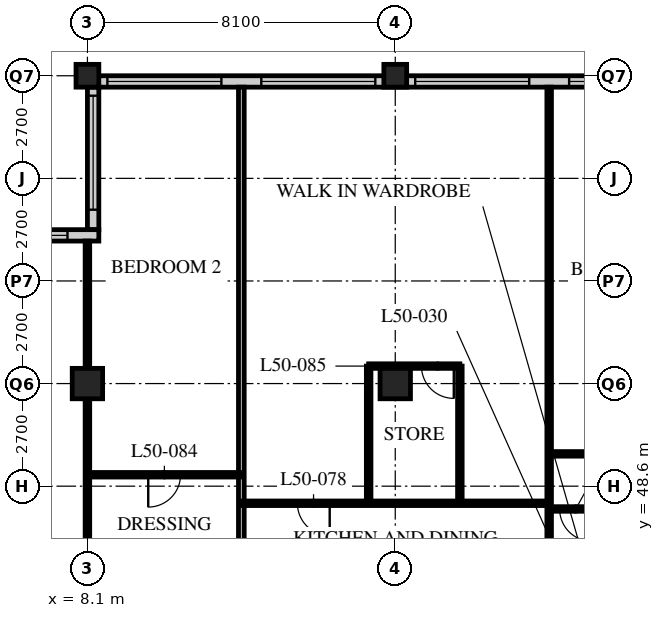
"""IFC4 building model, lengths in metres.
Left out: names, types, materials, properties, quantities, classifications, styles, units other than length and angle.
Written with IfcOpenShell. Run it as: python <this file> out.ifc"""

import sys

from ifc_helpers import new_model, si_unit, direction, frame, frame_2d, origin, origin_2d, place, context, subcontext, project, spatial, rectangle, hollow_rectangle, extrude, element, fill, save


model = new_model("IFC4")
c1 = context("Model", 3, precision=1e-05, world=origin(), true_north=direction((0.0, 1.0)))
c2 = subcontext(c1, "Body", "Model", "MODEL_VIEW")
j1 = project(units=[si_unit("LENGTHUNIT", "METRE"), si_unit("PLANEANGLEUNIT", "RADIAN")], contexts=[c1])
p1 = place(None, origin())
s1 = spatial("IfcSite", under=j1, at=p1, CompositionType="ELEMENT")
p2 = place(p1, origin())
s2 = spatial("IfcBuilding", under=s1, at=p2, CompositionType="ELEMENT")
p3 = place(p2, frame((0.0, 0.0, 195.6)))
s3 = spatial("IfcBuildingStorey", under=s2, at=p3, CompositionType="ELEMENT", Elevation=195.6)
p4 = place(p3, frame((8.1, 51.3, 0.0), z_axis=(0.0, 0.0, 1.0), x_axis=(1.0, 0.0, 0.0)))
e1 = element("IfcColumn", 1, at=p4, inside=s3, PredefinedType="COLUMN", context=c2, shape_type="SweptSolid", body=[
    extrude(hollow_rectangle(XDim=0.8, YDim=0.8, WallThickness=0.08, at=origin_2d()), origin(), (0.0, 0.0, 1.0), 3.6),
])
p5 = place(p3, frame((8.1, 59.4, 0.0), z_axis=(0.0, 0.0, 1.0), x_axis=(1.0, 0.0, 0.0)))
e2 = element("IfcColumn", 2, at=p5, inside=s3, PredefinedType="COLUMN", context=c2, shape_type="SweptSolid", body=[
    extrude(hollow_rectangle(XDim=0.6, YDim=0.6, WallThickness=0.05, at=origin_2d()), origin(), (0.0, 0.0, 1.0), 3.6),
])
p6 = place(p3, frame((16.2, 51.3, 0.0), z_axis=(0.0, 0.0, 1.0), x_axis=(1.0, 0.0, 0.0)))
e3 = element("IfcColumn", 3, at=p6, inside=s3, PredefinedType="COLUMN", context=c2, shape_type="SweptSolid", body=[
    extrude(hollow_rectangle(XDim=0.8, YDim=0.8, WallThickness=0.08, at=origin_2d()), origin(), (0.0, 0.0, 1.0), 3.6),
])
p7 = place(p3, frame((16.2, 59.4, 0.0), z_axis=(0.0, 0.0, 1.0), x_axis=(1.0, 0.0, 0.0)))
e4 = element("IfcColumn", 4, at=p7, inside=s3, PredefinedType="COLUMN", context=c2, shape_type="SweptSolid", body=[
    extrude(hollow_rectangle(XDim=0.6, YDim=0.6, WallThickness=0.05, at=origin_2d()), origin(), (0.0, 0.0, 1.0), 3.6),
])
p8 = place(p3, frame((48.3, 59.25, 0.0), z_axis=(0.0, 0.0, 1.0), x_axis=(-1.0, 0.0, 0.0)))
e5 = element("IfcWall", 5, at=p8, inside=s3, PredefinedType="SOLIDWALL", context=c2, shape_type="SweptSolid", body=[
    extrude(rectangle(XDim=40.2, YDim=0.3, at=frame_2d((20.1, 0.0))), origin(), (0.0, 0.0, 1.0), 3.39),
])
p9 = place(p8, frame((0.225, 0.0, 0.6)))
e6 = element("IfcOpeningElement", 6, at=p9, cuts=e5, PredefinedType="OPENING", context=c2, shape_type="SweptSolid", body=[
    extrude(rectangle(XDim=3.0, YDim=2.4, at=frame_2d((1.5, 1.2))), frame((0.0, 0.16, 0.0), z_axis=(0.0, -1.0, 0.0), x_axis=(1.0, 0.0, 0.0)), (0.0, 0.0, 1.0), 0.32),
])
p10 = place(p8, frame((4.275, 0.0, 0.6)))
e7 = element("IfcOpeningElement", 7, at=p10, cuts=e5, PredefinedType="OPENING", context=c2, shape_type="SweptSolid", body=[
    extrude(rectangle(XDim=3.0, YDim=2.4, at=frame_2d((1.5, 1.2))), frame((0.0, 0.16, 0.0), z_axis=(0.0, -1.0, 0.0), x_axis=(1.0, 0.0, 0.0)), (0.0, 0.0, 1.0), 0.32),
])
p11 = place(p8, frame((8.325, 0.0, 0.6)))
e8 = element("IfcOpeningElement", 8, at=p11, cuts=e5, PredefinedType="OPENING", context=c2, shape_type="SweptSolid", body=[
    extrude(rectangle(XDim=3.0, YDim=2.4, at=frame_2d((1.5, 1.2))), frame((0.0, 0.16, 0.0), z_axis=(0.0, -1.0, 0.0), x_axis=(1.0, 0.0, 0.0)), (0.0, 0.0, 1.0), 0.32),
])
p12 = place(p8, frame((12.375, 0.0, 0.6)))
e9 = element("IfcOpeningElement", 9, at=p12, cuts=e5, PredefinedType="OPENING", context=c2, shape_type="SweptSolid", body=[
    extrude(rectangle(XDim=3.0, YDim=2.4, at=frame_2d((1.5, 1.2))), frame((0.0, 0.16, 0.0), z_axis=(0.0, -1.0, 0.0), x_axis=(1.0, 0.0, 0.0)), (0.0, 0.0, 1.0), 0.32),
])
p13 = place(p8, frame((16.425, 0.0, 0.6)))
e10 = element("IfcOpeningElement", 10, at=p13, cuts=e5, PredefinedType="OPENING", context=c2, shape_type="SweptSolid", body=[
    extrude(rectangle(XDim=3.0, YDim=2.4, at=frame_2d((1.5, 1.2))), frame((0.0, 0.16, 0.0), z_axis=(0.0, -1.0, 0.0), x_axis=(1.0, 0.0, 0.0)), (0.0, 0.0, 1.0), 0.32),
])
p14 = place(p8, frame((20.475, 0.0, 0.6)))
e11 = element("IfcOpeningElement", 11, at=p14, cuts=e5, PredefinedType="OPENING", context=c2, shape_type="SweptSolid", body=[
    extrude(rectangle(XDim=3.0, YDim=2.4, at=frame_2d((1.5, 1.2))), frame((0.0, 0.16, 0.0), z_axis=(0.0, -1.0, 0.0), x_axis=(1.0, 0.0, 0.0)), (0.0, 0.0, 1.0), 0.32),
])
p15 = place(p8, frame((24.525, 0.0, 0.6)))
e12 = element("IfcOpeningElement", 12, at=p15, cuts=e5, PredefinedType="OPENING", context=c2, shape_type="SweptSolid", body=[
    extrude(rectangle(XDim=3.0, YDim=2.4, at=frame_2d((1.5, 1.2))), frame((0.0, 0.16, 0.0), z_axis=(0.0, -1.0, 0.0), x_axis=(1.0, 0.0, 0.0)), (0.0, 0.0, 1.0), 0.32),
])
p16 = place(p8, frame((28.575, 0.0, 0.6)))
e13 = element("IfcOpeningElement", 13, at=p16, cuts=e5, PredefinedType="OPENING", context=c2, shape_type="SweptSolid", body=[
    extrude(rectangle(XDim=3.0, YDim=2.4, at=frame_2d((1.5, 1.2))), frame((0.0, 0.16, 0.0), z_axis=(0.0, -1.0, 0.0), x_axis=(1.0, 0.0, 0.0)), (0.0, 0.0, 1.0), 0.32),
])
p17 = place(p8, frame((32.625, 0.0, 0.6)))
e14 = element("IfcOpeningElement", 14, at=p17, cuts=e5, PredefinedType="OPENING", context=c2, shape_type="SweptSolid", body=[
    extrude(rectangle(XDim=3.0, YDim=2.4, at=frame_2d((1.5, 1.2))), frame((0.0, 0.16, 0.0), z_axis=(0.0, -1.0, 0.0), x_axis=(1.0, 0.0, 0.0)), (0.0, 0.0, 1.0), 0.32),
])
p18 = place(p8, frame((36.675, 0.0, 0.6)))
e15 = element("IfcOpeningElement", 15, at=p18, cuts=e5, PredefinedType="OPENING", context=c2, shape_type="SweptSolid", body=[
    extrude(rectangle(XDim=3.0, YDim=2.4, at=frame_2d((1.5, 1.2))), frame((0.0, 0.16, 0.0), z_axis=(0.0, -1.0, 0.0), x_axis=(1.0, 0.0, 0.0)), (0.0, 0.0, 1.0), 0.32),
])
p19 = place(p3, frame((8.25, 59.1, 0.0), z_axis=(0.0, 0.0, 1.0), x_axis=(0.0, -1.0, 0.0)))
e16 = element("IfcWall", 16, at=p19, inside=s3, PredefinedType="SOLIDWALL", context=c2, shape_type="SweptSolid", body=[
    extrude(rectangle(XDim=3.75, YDim=0.3, at=frame_2d((1.875, 0.0))), origin(), (0.0, 0.0, 1.0), 3.39),
])
p20 = place(p19, frame((0.225, 0.0, 0.6)))
e17 = element("IfcOpeningElement", 17, at=p20, cuts=e16, PredefinedType="OPENING", context=c2, shape_type="SweptSolid", body=[
    extrude(rectangle(XDim=3.0, YDim=2.0, at=frame_2d((1.5, 1.0))), frame((0.0, 0.16, 0.0), z_axis=(0.0, -1.0, 0.0), x_axis=(1.0, 0.0, 0.0)), (0.0, 0.0, 1.0), 0.32),
])
p21 = place(p3, frame((8.4, 55.2, 0.0), z_axis=(0.0, 0.0, 1.0), x_axis=(-1.0, 0.0, 0.0)))
e18 = element("IfcWall", 18, at=p21, inside=s3, PredefinedType="SOLIDWALL", context=c2, shape_type="SweptSolid", body=[
    extrude(rectangle(XDim=4.35, YDim=0.3, at=frame_2d((2.175, 0.0))), origin(), (0.0, 0.0, 1.0), 3.39),
])
p22 = place(p21, frame((0.825, 0.0, 0.6)))
e19 = element("IfcOpeningElement", 19, at=p22, cuts=e18, PredefinedType="OPENING", context=c2, shape_type="SweptSolid", body=[
    extrude(rectangle(XDim=3.0, YDim=2.0, at=frame_2d((1.5, 1.0))), frame((0.0, 0.16, 0.0), z_axis=(0.0, -1.0, 0.0), x_axis=(1.0, 0.0, 0.0)), (0.0, 0.0, 1.0), 0.32),
])
p23 = place(p3, frame((20.25, 45.6, 0.0), z_axis=(0.0, 0.0, 1.0), x_axis=(0.0, 1.0, 0.0)))
e20 = element("IfcWall", 20, at=p23, inside=s3, PredefinedType="PARTITIONING", context=c2, shape_type="SweptSolid", body=[
    extrude(rectangle(XDim=13.5, YDim=0.12, at=frame_2d((6.75, 0.0))), origin(), (0.0, 0.0, 1.0), 3.39),
])
p24 = place(p3, frame((8.1, 45.6, 0.0), z_axis=(0.0, 0.0, 1.0), x_axis=(0.0, 1.0, 0.0)))
e21 = element("IfcWall", 21, at=p24, inside=s3, PredefinedType="PARTITIONING", context=c2, shape_type="SweptSolid", body=[
    extrude(rectangle(XDim=9.45, YDim=0.12, at=frame_2d((4.725, 0.0))), origin(), (0.0, 0.0, 1.0), 2.778),
])
p25 = place(p3, frame((12.15, 43.2, 0.0), z_axis=(0.0, 0.0, 1.0), x_axis=(0.0, 1.0, 0.0)))
e22 = element("IfcWall", 22, at=p25, inside=s3, PredefinedType="PARTITIONING", context=c2, shape_type="SweptSolid", body=[
    extrude(rectangle(XDim=15.9, YDim=0.15, at=frame_2d((7.95, 0.0))), origin(), (0.0, 0.0, 1.0), 3.39),
])
p26 = place(p3, frame((20.25, 48.0, 0.0), z_axis=(0.0, 0.0, 1.0), x_axis=(1.0, 0.0, 0.0)))
e23 = element("IfcWall", 23, at=p26, inside=s3, PredefinedType="PARTITIONING", context=c2, shape_type="SweptSolid", body=[
    extrude(rectangle(XDim=1.76, YDim=0.12, at=frame_2d((0.88, 0.0))), origin(), (0.0, 0.0, 1.0), 3.39),
])
p27 = place(p26, frame((0.275, 0.0, 0.0)))
e24 = element("IfcOpeningElement", 24, at=p27, cuts=e23, PredefinedType="OPENING", context=c2, shape_type="SweptSolid", body=[
    extrude(rectangle(XDim=0.85, YDim=2.1, at=frame_2d((0.425, 1.05))), frame((0.0, 0.07, 0.0), z_axis=(0.0, -1.0, 0.0), x_axis=(1.0, 0.0, 0.0)), (0.0, 0.0, 1.0), 0.14),
])
p28 = place(p3, frame((12.15, 48.15, 0.0), z_axis=(0.0, 0.0, 1.0), x_axis=(1.0, 0.0, 0.0)))
e25 = element("IfcWall", 25, at=p28, inside=s3, PredefinedType="PARTITIONING", context=c2, shape_type="SweptSolid", body=[
    extrude(rectangle(XDim=8.1, YDim=0.12, at=frame_2d((4.05, 0.0))), origin(), (0.0, 0.0, 1.0), 3.39),
])
p29 = place(p28, frame((1.475, 0.0, 0.0)))
e26 = element("IfcOpeningElement", 26, at=p29, cuts=e25, PredefinedType="OPENING", context=c2, shape_type="SweptSolid", body=[
    extrude(rectangle(XDim=0.85, YDim=2.1, at=frame_2d((0.425, 1.05))), frame((0.0, 0.07, 0.0), z_axis=(0.0, -1.0, 0.0), x_axis=(1.0, 0.0, 0.0)), (0.0, 0.0, 1.0), 0.14),
])
p30 = place(p3, frame((20.25, 49.45, 0.0), z_axis=(0.0, 0.0, 1.0), x_axis=(1.0, 0.0, 0.0)))
e27 = element("IfcWall", 27, at=p30, inside=s3, PredefinedType="PARTITIONING", context=c2, shape_type="SweptSolid", body=[
    extrude(rectangle(XDim=4.05, YDim=0.12, at=frame_2d((2.025, 0.0))), origin(), (0.0, 0.0, 1.0), 3.39),
])
p31 = place(p30, frame((1.6, 0.0, 0.0)))
e28 = element("IfcOpeningElement", 28, at=p31, cuts=e27, PredefinedType="OPENING", context=c2, shape_type="SweptSolid", body=[
    extrude(rectangle(XDim=0.85, YDim=2.1, at=frame_2d((0.425, 1.05))), frame((0.0, 0.07, 0.0), z_axis=(0.0, -1.0, 0.0), x_axis=(1.0, 0.0, 0.0)), (0.0, 0.0, 1.0), 0.14),
])
p32 = place(p3, frame((8.1, 48.9, 0.0), z_axis=(0.0, 0.0, 1.0), x_axis=(1.0, 0.0, 0.0)))
e29 = element("IfcWall", 29, at=p32, inside=s3, PredefinedType="PARTITIONING", context=c2, shape_type="SweptSolid", body=[
    extrude(rectangle(XDim=4.05, YDim=0.12, at=frame_2d((2.025, 0.0))), origin(), (0.0, 0.0, 1.0), 3.39),
])
p33 = place(p32, frame((1.6, 0.0, 0.0)))
e30 = element("IfcOpeningElement", 30, at=p33, cuts=e29, PredefinedType="OPENING", context=c2, shape_type="SweptSolid", body=[
    extrude(rectangle(XDim=0.85, YDim=2.1, at=frame_2d((0.425, 1.05))), frame((0.0, 0.07, 0.0), z_axis=(0.0, -1.0, 0.0), x_axis=(1.0, 0.0, 0.0)), (0.0, 0.0, 1.0), 0.14),
])
for number, where, z_axis, x_axis in (
    (31, (15.5, 48.15, 0.0), (0.0, 0.0, 1.0), (0.0, 1.0, 0.0)),
    (32, (17.9, 48.15, 0.0), (0.0, 0.0, 1.0), (0.0, 1.0, 0.0)),
):
    element("IfcWall", number, at=place(p3, frame(where, z_axis=z_axis, x_axis=x_axis)), inside=s3, PredefinedType="PARTITIONING", context=c2, shape_type="SweptSolid", body=[
        extrude(rectangle(XDim=3.61, YDim=0.12, at=frame_2d((1.805, 0.0))), origin(), (0.0, 0.0, 1.0), 3.39),
    ])
p34 = place(p3, frame((15.5, 51.76, 0.0), z_axis=(0.0, 0.0, 1.0), x_axis=(1.0, 0.0, 0.0)))
e33 = element("IfcWall", 33, at=p34, inside=s3, PredefinedType="PARTITIONING", context=c2, shape_type="SweptSolid", body=[
    extrude(rectangle(XDim=2.4, YDim=0.12, at=frame_2d((1.2, 0.0))), origin(), (0.0, 0.0, 1.0), 3.39),
])
p35 = place(p34, frame((1.39, 0.0, 0.0)))
e34 = element("IfcOpeningElement", 34, at=p35, cuts=e33, PredefinedType="OPENING", context=c2, shape_type="SweptSolid", body=[
    extrude(rectangle(XDim=0.85, YDim=2.1, at=frame_2d((0.425, 1.05))), frame((0.0, 0.07, 0.0), z_axis=(0.0, -1.0, 0.0), x_axis=(1.0, 0.0, 0.0)), (0.0, 0.0, 1.0), 0.14),
])
p36 = place(p15, origin())
e35 = element("IfcWindow", 35, at=p36, inside=s3, PartitioningType="SINGLE_PANEL", PredefinedType="WINDOW", context=c2, shape_type="SweptSolid", body=[
    extrude(rectangle(XDim=3.0, YDim=2.4, at=frame_2d((1.5, 1.2))), frame((0.0, 0.03, 0.0), z_axis=(0.0, -1.0, 0.0), x_axis=(1.0, 0.0, 0.0)), (0.0, 0.0, 1.0), 0.06),
])
fill(e12, e35)
p37 = place(p16, origin())
e36 = element("IfcWindow", 36, at=p37, inside=s3, PartitioningType="SINGLE_PANEL", PredefinedType="WINDOW", context=c2, shape_type="SweptSolid", body=[
    extrude(rectangle(XDim=3.0, YDim=2.4, at=frame_2d((1.5, 1.2))), frame((0.0, 0.03, 0.0), z_axis=(0.0, -1.0, 0.0), x_axis=(1.0, 0.0, 0.0)), (0.0, 0.0, 1.0), 0.06),
])
fill(e13, e36)
p38 = place(p17, origin())
e37 = element("IfcWindow", 37, at=p38, inside=s3, PartitioningType="SINGLE_PANEL", PredefinedType="WINDOW", context=c2, shape_type="SweptSolid", body=[
    extrude(rectangle(XDim=3.0, YDim=2.4, at=frame_2d((1.5, 1.2))), frame((0.0, 0.03, 0.0), z_axis=(0.0, -1.0, 0.0), x_axis=(1.0, 0.0, 0.0)), (0.0, 0.0, 1.0), 0.06),
])
fill(e14, e37)
p39 = place(p18, origin())
e38 = element("IfcWindow", 38, at=p39, inside=s3, PartitioningType="SINGLE_PANEL", PredefinedType="WINDOW", context=c2, shape_type="SweptSolid", body=[
    extrude(rectangle(XDim=3.0, YDim=2.4, at=frame_2d((1.5, 1.2))), frame((0.0, 0.03, 0.0), z_axis=(0.0, -1.0, 0.0), x_axis=(1.0, 0.0, 0.0)), (0.0, 0.0, 1.0), 0.06),
])
fill(e15, e38)
p40 = place(p20, origin())
e39 = element("IfcWindow", 39, at=p40, inside=s3, PartitioningType="SINGLE_PANEL", PredefinedType="WINDOW", context=c2, shape_type="SweptSolid", body=[
    extrude(rectangle(XDim=3.0, YDim=2.0, at=frame_2d((1.5, 1.0))), frame((0.0, 0.03, 0.0), z_axis=(0.0, -1.0, 0.0), x_axis=(1.0, 0.0, 0.0)), (0.0, 0.0, 1.0), 0.06),
])
fill(e17, e39)
p41 = place(p22, origin())
e40 = element("IfcWindow", 40, at=p41, inside=s3, PartitioningType="SINGLE_PANEL", PredefinedType="WINDOW", context=c2, shape_type="SweptSolid", body=[
    extrude(rectangle(XDim=3.0, YDim=2.0, at=frame_2d((1.5, 1.0))), frame((0.0, 0.03, 0.0), z_axis=(0.0, -1.0, 0.0), x_axis=(1.0, 0.0, 0.0)), (0.0, 0.0, 1.0), 0.06),
])
fill(e19, e40)
p42 = place(p27, origin())
e41 = element("IfcDoor", 41, at=p42, inside=s3, OperationType="SINGLE_SWING_LEFT", PredefinedType="DOOR", context=c2, shape_type="SweptSolid", body=[
    extrude(rectangle(XDim=0.85, YDim=2.1, at=frame_2d((0.425, 1.05))), frame((0.0, 0.025, 0.0), z_axis=(0.0, -1.0, 0.0), x_axis=(1.0, 0.0, 0.0)), (0.0, 0.0, 1.0), 0.05),
])
fill(e24, e41)
p43 = place(p29, origin())
e42 = element("IfcDoor", 42, at=p43, inside=s3, OperationType="SINGLE_SWING_LEFT", PredefinedType="DOOR", context=c2, shape_type="SweptSolid", body=[
    extrude(rectangle(XDim=0.85, YDim=2.1, at=frame_2d((0.425, 1.05))), frame((0.0, 0.025, 0.0), z_axis=(0.0, -1.0, 0.0), x_axis=(1.0, 0.0, 0.0)), (0.0, 0.0, 1.0), 0.05),
])
fill(e26, e42)
p44 = place(p33, origin())
e43 = element("IfcDoor", 43, at=p44, inside=s3, OperationType="SINGLE_SWING_RIGHT", PredefinedType="DOOR", context=c2, shape_type="SweptSolid", body=[
    extrude(rectangle(XDim=0.85, YDim=2.1, at=frame_2d((0.425, 1.05))), frame((0.0, 0.025, 0.0), z_axis=(0.0, -1.0, 0.0), x_axis=(1.0, 0.0, 0.0)), (0.0, 0.0, 1.0), 0.05),
])
fill(e30, e43)
p45 = place(p35, origin())
e44 = element("IfcDoor", 44, at=p45, inside=s3, OperationType="SINGLE_SWING_LEFT", PredefinedType="DOOR", context=c2, shape_type="SweptSolid", body=[
    extrude(rectangle(XDim=0.85, YDim=2.1, at=frame_2d((0.425, 1.05))), frame((0.0, 0.025, 0.0), z_axis=(0.0, -1.0, 0.0), x_axis=(1.0, 0.0, 0.0)), (0.0, 0.0, 1.0), 0.05),
])
fill(e34, e44)
save(model, sys.argv[1])
